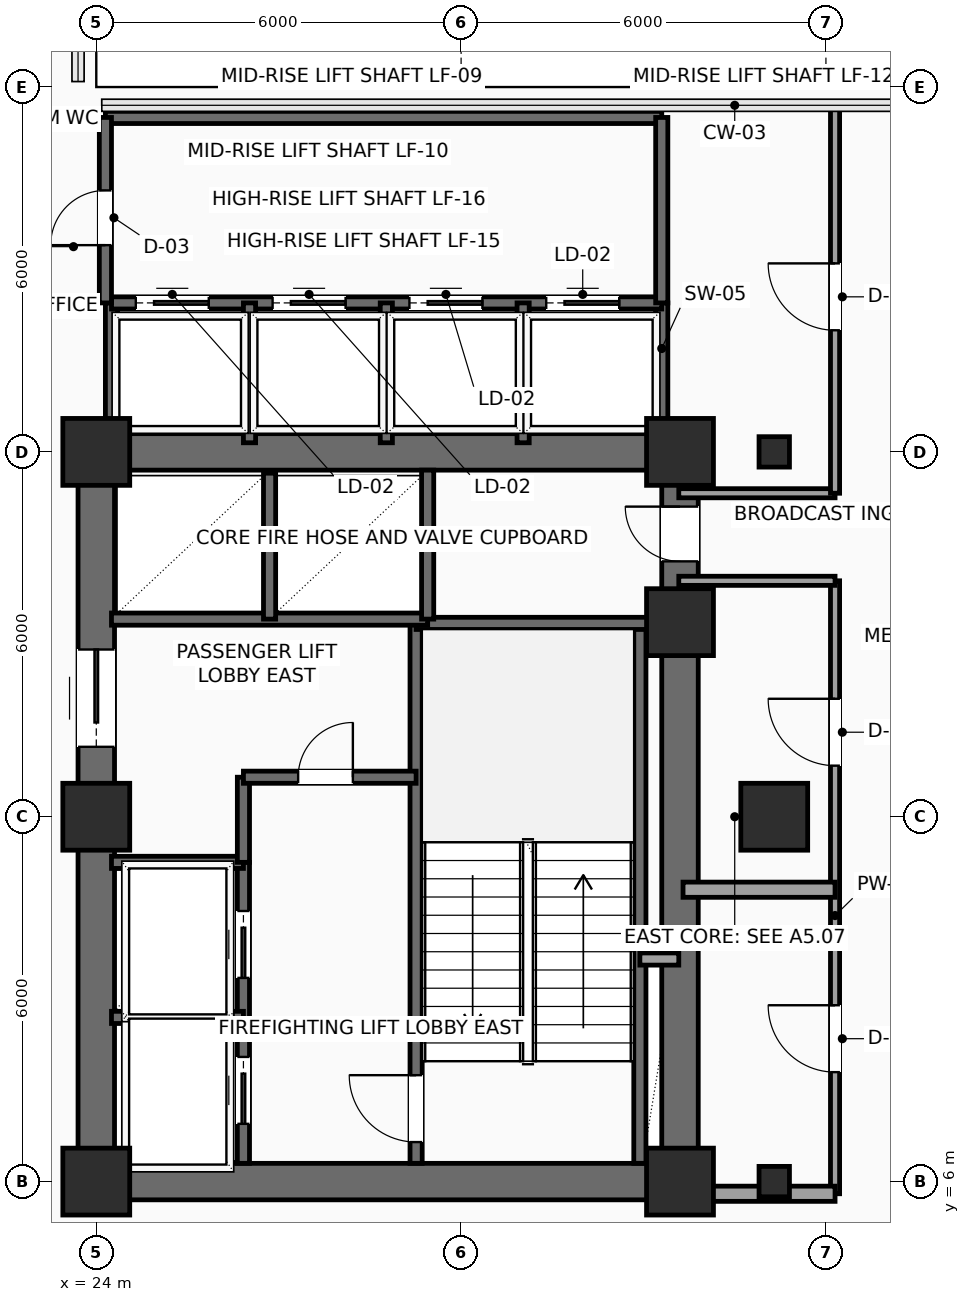
"""IFC4 building model, lengths in metres.
Left out: names, types, materials, properties, quantities, classifications, styles, units other than length and angle.
Written with IfcOpenShell. Run it as: python <this file> out.ifc"""

import sys

from ifc_helpers import new_model, si_unit, direction, frame, frame_2d, origin, origin_2d, place, context, subcontext, project, spatial, rectangle, hollow_rectangle, extrude, element, fill, save


model = new_model("IFC4")
c1 = context("Model", 3, precision=1e-05, world=origin(), true_north=direction((0.0, 1.0)))
c2 = subcontext(c1, "Body", "Model", "MODEL_VIEW")
j1 = project(units=[si_unit("LENGTHUNIT", "METRE"), si_unit("PLANEANGLEUNIT", "RADIAN")], contexts=[c1])
p1 = place(None, origin())
s1 = spatial("IfcSite", under=j1, at=p1, CompositionType="ELEMENT")
p2 = place(p1, origin())
s2 = spatial("IfcBuilding", under=s1, at=p2, CompositionType="ELEMENT")
p3 = place(p2, frame((0.0, 0.0, 134.4)))
s3 = spatial("IfcBuildingStorey", under=s2, at=p3, CompositionType="ELEMENT", Elevation=134.4)
for number, where, z_axis, x_axis in (
    (1, (24.0, 6.0, 0.0), (0.0, 0.0, 1.0), (1.0, 0.0, 0.0)),
    (2, (24.0, 12.0, 0.0), (0.0, 0.0, 1.0), (1.0, 0.0, 0.0)),
    (3, (24.0, 18.0, 0.0), (0.0, 0.0, 1.0), (1.0, 0.0, 0.0)),
    (4, (33.6, 6.0, 0.0), (0.0, 0.0, 1.0), (1.0, 0.0, 0.0)),
    (5, (33.6, 15.2, 0.0), (0.0, 0.0, 1.0), (1.0, 0.0, 0.0)),
    (6, (33.6, 18.0, 0.0), (0.0, 0.0, 1.0), (1.0, 0.0, 0.0)),
):
    element("IfcColumn", number, at=place(p3, frame(where, z_axis=z_axis, x_axis=x_axis)), inside=s3, PredefinedType="COLUMN", context=c2, shape_type="SweptSolid", body=[
        extrude(rectangle(XDim=1.1, YDim=1.1, at=origin_2d()), origin(), (0.0, 0.0, 1.0), 3.75),
    ])
p4 = place(p3, frame((35.15, 6.0, 0.0), z_axis=(0.0, 0.0, 1.0), x_axis=(1.0, 0.0, 0.0)))
e7 = element("IfcColumn", 7, at=p4, inside=s3, PredefinedType="COLUMN", context=c2, shape_type="SweptSolid", body=[
    extrude(hollow_rectangle(XDim=0.5, YDim=0.5, WallThickness=0.025, InnerFilletRadius=0.025, OuterFilletRadius=0.04, at=origin_2d()), origin(), (0.0, 0.0, 1.0), 3.75),
])
p5 = place(p3, frame((35.15, 12.0, 0.0), z_axis=(0.0, 0.0, 1.0), x_axis=(1.0, 0.0, 0.0)))
e8 = element("IfcColumn", 8, at=p5, inside=s3, PredefinedType="COLUMN", context=c2, shape_type="SweptSolid", body=[
    extrude(rectangle(XDim=1.1, YDim=1.1, at=origin_2d()), origin(), (0.0, 0.0, 1.0), 3.75),
])
p6 = place(p3, frame((35.15, 18.0, 0.0), z_axis=(0.0, 0.0, 1.0), x_axis=(1.0, 0.0, 0.0)))
e9 = element("IfcColumn", 9, at=p6, inside=s3, PredefinedType="COLUMN", context=c2, shape_type="SweptSolid", body=[
    extrude(hollow_rectangle(XDim=0.5, YDim=0.5, WallThickness=0.025, InnerFilletRadius=0.025, OuterFilletRadius=0.04, at=origin_2d()), origin(), (0.0, 0.0, 1.0), 3.75),
])
for number, where, z_axis, x_axis in (
    (10, (24.0, 6.0, 0.0), (0.0, 0.0, 1.0), (1.0, 0.0, 0.0)),
    (11, (24.0, 18.0, 0.0), (0.0, 0.0, 1.0), (1.0, 0.0, 0.0)),
):
    element("IfcWall", number, at=place(p3, frame(where, z_axis=z_axis, x_axis=x_axis)), inside=s3, PredefinedType="SHEAR", context=c2, shape_type="SweptSolid", body=[
        extrude(rectangle(XDim=9.6, YDim=0.6, at=frame_2d((4.8, 0.0))), origin(), (0.0, 0.0, 1.0), 3.525),
    ])
p7 = place(p3, frame((24.0, 6.0, 0.0), z_axis=(0.0, 0.0, 1.0), x_axis=(0.0, 1.0, 0.0)))
e12 = element("IfcWall", 12, at=p7, inside=s3, PredefinedType="SHEAR", context=c2, shape_type="SweptSolid", body=[
    extrude(rectangle(XDim=12.0, YDim=0.6, at=frame_2d((6.0, 0.0))), origin(), (0.0, 0.0, 1.0), 3.525),
])
p8 = place(p7, frame((7.15, 0.0, 0.0)))
e13 = element("IfcOpeningElement", 13, at=p8, cuts=e12, PredefinedType="OPENING", context=c2, shape_type="SweptSolid", body=[
    extrude(rectangle(XDim=1.6, YDim=2.3, at=frame_2d((0.8, 1.15))), frame((0.0, 0.31, 0.0), z_axis=(0.0, -1.0, 0.0), x_axis=(1.0, 0.0, 0.0)), (0.0, 0.0, 1.0), 0.62),
])
p9 = place(p3, frame((33.6, 6.0, 0.0), z_axis=(0.0, 0.0, 1.0), x_axis=(0.0, 1.0, 0.0)))
e14 = element("IfcWall", 14, at=p9, inside=s3, PredefinedType="SHEAR", context=c2, shape_type="SweptSolid", body=[
    extrude(rectangle(XDim=12.0, YDim=0.6, at=frame_2d((6.0, 0.0))), origin(), (0.0, 0.0, 1.0), 3.525),
])
p10 = place(p9, frame((10.2, 0.0, 0.0)))
e15 = element("IfcOpeningElement", 15, at=p10, cuts=e14, PredefinedType="OPENING", context=c2, shape_type="SweptSolid", body=[
    extrude(rectangle(XDim=0.9, YDim=2.15, at=frame_2d((0.45, 1.075))), frame((0.0, 0.31, 0.0), z_axis=(0.0, -1.0, 0.0), x_axis=(1.0, 0.0, 0.0)), (0.0, 0.0, 1.0), 0.62),
])
p11 = place(p3, frame((29.26, 6.3, 0.0), z_axis=(0.0, 0.0, 1.0), x_axis=(0.0, 1.0, 0.0)))
e16 = element("IfcWall", 16, at=p11, inside=s3, PredefinedType="SHEAR", context=c2, shape_type="SweptSolid", body=[
    extrude(rectangle(XDim=8.88, YDim=0.2, at=frame_2d((4.44, 0.0))), origin(), (0.0, 0.0, 1.0), 3.525),
])
p12 = place(p11, frame((0.35, 0.0, 0.0)))
e17 = element("IfcOpeningElement", 17, at=p12, cuts=e16, PredefinedType="OPENING", context=c2, shape_type="SweptSolid", body=[
    extrude(rectangle(XDim=1.1, YDim=2.2, at=frame_2d((0.55, 1.1))), frame((0.0, 0.11, 0.0), z_axis=(0.0, -1.0, 0.0), x_axis=(1.0, 0.0, 0.0)), (0.0, 0.0, 1.0), 0.22),
])
p13 = place(p3, frame((32.94, 6.3, 0.0), z_axis=(0.0, 0.0, 1.0), x_axis=(0.0, 1.0, 0.0)))
e18 = element("IfcWall", 18, at=p13, inside=s3, PredefinedType="SHEAR", context=c2, shape_type="SweptSolid", body=[
    extrude(rectangle(XDim=8.88, YDim=0.2, at=frame_2d((4.44, 0.0))), origin(), (0.0, 0.0, 1.0), 3.525),
])
p14 = place(p3, frame((29.26, 15.18, 0.0), z_axis=(0.0, 0.0, 1.0), x_axis=(1.0, 0.0, 0.0)))
e19 = element("IfcWall", 19, at=p14, inside=s3, PredefinedType="SHEAR", context=c2, shape_type="SweptSolid", body=[
    extrude(rectangle(XDim=4.04, YDim=0.2, at=frame_2d((2.02, 0.0))), origin(), (0.0, 0.0, 1.0), 3.525),
])
p15 = place(p3, frame((26.42, 6.3, 0.0), z_axis=(0.0, 0.0, 1.0), x_axis=(0.0, 1.0, 0.0)))
e20 = element("IfcWall", 20, at=p15, inside=s3, PredefinedType="SHEAR", context=c2, shape_type="SweptSolid", body=[
    extrude(rectangle(XDim=4.95, YDim=0.2, at=frame_2d((2.475, 0.0))), origin(), (0.0, 0.0, 1.0), 3.525),
])
p16 = place(p15, frame((0.65, 0.0, 0.0)))
e21 = element("IfcOpeningElement", 21, at=p16, cuts=e20, PredefinedType="OPENING", context=c2, shape_type="SweptSolid", body=[
    extrude(rectangle(XDim=1.1, YDim=2.2, at=frame_2d((0.55, 1.1))), frame((0.0, 0.11, 0.0), z_axis=(0.0, -1.0, 0.0), x_axis=(1.0, 0.0, 0.0)), (0.0, 0.0, 1.0), 0.22),
])
p17 = place(p15, frame((3.05, 0.0, 0.0)))
e22 = element("IfcOpeningElement", 22, at=p17, cuts=e20, PredefinedType="OPENING", context=c2, shape_type="SweptSolid", body=[
    extrude(rectangle(XDim=1.1, YDim=2.2, at=frame_2d((0.55, 1.1))), frame((0.0, 0.11, 0.0), z_axis=(0.0, -1.0, 0.0), x_axis=(1.0, 0.0, 0.0)), (0.0, 0.0, 1.0), 0.22),
])
for number, where, z_axis, x_axis in (
    (23, (24.25, 8.7, 0.0), (0.0, 0.0, 1.0), (1.0, 0.0, 0.0)),
    (24, (24.25, 11.25, 0.0), (0.0, 0.0, 1.0), (1.0, 0.0, 0.0)),
):
    element("IfcWall", number, at=place(p3, frame(where, z_axis=z_axis, x_axis=x_axis)), inside=s3, PredefinedType="SHEAR", context=c2, shape_type="SweptSolid", body=[
        extrude(rectangle(XDim=2.17, YDim=0.2, at=frame_2d((1.085, 0.0))), origin(), (0.0, 0.0, 1.0), 3.525),
    ])
p18 = place(p3, frame((26.42, 11.25, 0.0), z_axis=(0.0, 0.0, 1.0), x_axis=(0.0, 1.0, 0.0)))
e25 = element("IfcWall", 25, at=p18, inside=s3, PredefinedType="SHEAR", context=c2, shape_type="SweptSolid", body=[
    extrude(rectangle(XDim=1.4, YDim=0.2, at=frame_2d((0.7, 0.0))), origin(), (0.0, 0.0, 1.0), 3.525),
])
p19 = place(p3, frame((26.42, 12.65, 0.0), z_axis=(0.0, 0.0, 1.0), x_axis=(1.0, 0.0, 0.0)))
e26 = element("IfcWall", 26, at=p19, inside=s3, PredefinedType="SHEAR", context=c2, shape_type="SweptSolid", body=[
    extrude(rectangle(XDim=2.84, YDim=0.2, at=frame_2d((1.42, 0.0))), origin(), (0.0, 0.0, 1.0), 3.525),
])
p20 = place(p19, frame((0.9, 0.0, 0.0)))
e27 = element("IfcOpeningElement", 27, at=p20, cuts=e26, PredefinedType="OPENING", context=c2, shape_type="SweptSolid", body=[
    extrude(rectangle(XDim=0.9, YDim=2.15, at=frame_2d((0.45, 1.075))), frame((0.0, 0.11, 0.0), z_axis=(0.0, -1.0, 0.0), x_axis=(1.0, 0.0, 0.0)), (0.0, 0.0, 1.0), 0.22),
])
p21 = place(p3, frame((32.94, 9.66, 0.0), z_axis=(0.0, 0.0, 1.0), x_axis=(1.0, 0.0, 0.0)))
e28 = element("IfcWall", 28, at=p21, inside=s3, PredefinedType="SOLIDWALL", context=c2, shape_type="SweptSolid", body=[
    extrude(rectangle(XDim=0.64, YDim=0.2, at=frame_2d((0.32, 0.0))), origin(), (0.0, 0.0, 1.0), 3.525),
])
p22 = place(p3, frame((24.25, 15.25, 0.0), z_axis=(0.0, 0.0, 1.0), x_axis=(1.0, 0.0, 0.0)))
e29 = element("IfcWall", 29, at=p22, inside=s3, PredefinedType="SHEAR", context=c2, shape_type="SweptSolid", body=[
    extrude(rectangle(XDim=5.2, YDim=0.2, at=frame_2d((2.6, 0.0))), origin(), (0.0, 0.0, 1.0), 3.525),
])
p23 = place(p3, frame((26.85, 15.25, 0.0), z_axis=(0.0, 0.0, 1.0), x_axis=(0.0, 1.0, 0.0)))
e30 = element("IfcWall", 30, at=p23, inside=s3, PredefinedType="SHEAR", context=c2, shape_type="SweptSolid", body=[
    extrude(rectangle(XDim=2.4, YDim=0.2, at=frame_2d((1.2, 0.0))), origin(), (0.0, 0.0, 1.0), 3.525),
])
p24 = place(p3, frame((29.45, 15.25, 0.0), z_axis=(0.0, 0.0, 1.0), x_axis=(0.0, 1.0, 0.0)))
e31 = element("IfcWall", 31, at=p24, inside=s3, PredefinedType="SHEAR", context=c2, shape_type="SweptSolid", body=[
    extrude(rectangle(XDim=2.45, YDim=0.2, at=frame_2d((1.225, 0.0))), origin(), (0.0, 0.0, 1.0), 3.525),
])
for number, where, z_axis, x_axis in (
    (32, (33.3, 18.1, 0.0), (0.0, 0.0, 1.0), (0.0, 1.0, 0.0)),
    (33, (24.25, 18.1, 0.0), (0.0, 0.0, 1.0), (0.0, 1.0, 0.0)),
):
    element("IfcWall", number, at=place(p3, frame(where, z_axis=z_axis, x_axis=x_axis)), inside=s3, PredefinedType="SHEAR", context=c2, shape_type="SweptSolid", body=[
        extrude(rectangle(XDim=2.35, YDim=0.2, at=frame_2d((1.175, 0.0))), origin(), (0.0, 0.0, 1.0), 3.525),
    ])
p25 = place(p3, frame((24.25, 20.45, 0.0), z_axis=(0.0, 0.0, 1.0), x_axis=(1.0, 0.0, 0.0)))
e34 = element("IfcWall", 34, at=p25, inside=s3, PredefinedType="SHEAR", context=c2, shape_type="SweptSolid", body=[
    extrude(rectangle(XDim=9.05, YDim=0.2, at=frame_2d((4.525, 0.0))), origin(), (0.0, 0.0, 1.0), 3.525),
])
p26 = place(p25, frame((0.4, 0.0, 0.0)))
e35 = element("IfcOpeningElement", 35, at=p26, cuts=e34, PredefinedType="OPENING", context=c2, shape_type="SweptSolid", body=[
    extrude(rectangle(XDim=1.2, YDim=2.2, at=frame_2d((0.6, 1.1))), frame((0.0, 0.11, 0.0), z_axis=(0.0, -1.0, 0.0), x_axis=(1.0, 0.0, 0.0)), (0.0, 0.0, 1.0), 0.22),
])
p27 = place(p25, frame((2.65, 0.0, 0.0)))
e36 = element("IfcOpeningElement", 36, at=p27, cuts=e34, PredefinedType="OPENING", context=c2, shape_type="SweptSolid", body=[
    extrude(rectangle(XDim=1.2, YDim=2.2, at=frame_2d((0.6, 1.1))), frame((0.0, 0.11, 0.0), z_axis=(0.0, -1.0, 0.0), x_axis=(1.0, 0.0, 0.0)), (0.0, 0.0, 1.0), 0.22),
])
p28 = place(p25, frame((4.9, 0.0, 0.0)))
e37 = element("IfcOpeningElement", 37, at=p28, cuts=e34, PredefinedType="OPENING", context=c2, shape_type="SweptSolid", body=[
    extrude(rectangle(XDim=1.2, YDim=2.2, at=frame_2d((0.6, 1.1))), frame((0.0, 0.11, 0.0), z_axis=(0.0, -1.0, 0.0), x_axis=(1.0, 0.0, 0.0)), (0.0, 0.0, 1.0), 0.22),
])
p29 = place(p25, frame((7.15, 0.0, 0.0)))
e38 = element("IfcOpeningElement", 38, at=p29, cuts=e34, PredefinedType="OPENING", context=c2, shape_type="SweptSolid", body=[
    extrude(rectangle(XDim=1.2, YDim=2.2, at=frame_2d((0.6, 1.1))), frame((0.0, 0.11, 0.0), z_axis=(0.0, -1.0, 0.0), x_axis=(1.0, 0.0, 0.0)), (0.0, 0.0, 1.0), 0.22),
])
for number, where, z_axis, x_axis in (
    (39, (26.52, 18.15, 0.0), (0.0, 0.0, 1.0), (0.0, 1.0, 0.0)),
    (40, (28.77, 18.15, 0.0), (0.0, 0.0, 1.0), (0.0, 1.0, 0.0)),
    (41, (31.02, 18.15, 0.0), (0.0, 0.0, 1.0), (0.0, 1.0, 0.0)),
):
    element("IfcWall", number, at=place(p3, frame(where, z_axis=z_axis, x_axis=x_axis)), inside=s3, PredefinedType="SHEAR", context=c2, shape_type="SweptSolid", body=[
        extrude(rectangle(XDim=2.3, YDim=0.2, at=frame_2d((1.15, 0.0))), origin(), (0.0, 0.0, 1.0), 3.525),
    ])
p30 = place(p3, frame((24.15, 23.5, 0.0), z_axis=(0.0, 0.0, 1.0), x_axis=(1.0, 0.0, 0.0)))
e42 = element("IfcWall", 42, at=p30, inside=s3, PredefinedType="SHEAR", context=c2, shape_type="SweptSolid", body=[
    extrude(rectangle(XDim=9.15, YDim=0.2, at=frame_2d((4.575, 0.0))), origin(), (0.0, 0.0, 1.0), 3.525),
])
p31 = place(p3, frame((33.3, 20.45, 0.0), z_axis=(0.0, 0.0, 1.0), x_axis=(0.0, 1.0, 0.0)))
e43 = element("IfcWall", 43, at=p31, inside=s3, PredefinedType="SHEAR", context=c2, shape_type="SweptSolid", body=[
    extrude(rectangle(XDim=3.05, YDim=0.2, at=frame_2d((1.525, 0.0))), origin(), (0.0, 0.0, 1.0), 3.525),
])
p32 = place(p3, frame((24.15, 20.45, 0.0), z_axis=(0.0, 0.0, 1.0), x_axis=(0.0, 1.0, 0.0)))
e44 = element("IfcWall", 44, at=p32, inside=s3, PredefinedType="SHEAR", context=c2, shape_type="SweptSolid", body=[
    extrude(rectangle(XDim=3.05, YDim=0.2, at=frame_2d((1.525, 0.0))), origin(), (0.0, 0.0, 1.0), 3.525),
])
p33 = place(p32, frame((0.95, 0.0, 0.0)))
e45 = element("IfcOpeningElement", 45, at=p33, cuts=e44, PredefinedType="OPENING", context=c2, shape_type="SweptSolid", body=[
    extrude(rectangle(XDim=0.9, YDim=2.15, at=frame_2d((0.45, 1.075))), frame((0.0, 0.11, 0.0), z_axis=(0.0, -1.0, 0.0), x_axis=(1.0, 0.0, 0.0)), (0.0, 0.0, 1.0), 0.22),
])
p34 = place(p3, frame((36.15, 5.8, 0.0), z_axis=(0.0, 0.0, 1.0), x_axis=(0.0, 1.0, 0.0)))
e46 = element("IfcWall", 46, at=p34, inside=s3, PredefinedType="PARTITIONING", context=c2, shape_type="SweptSolid", body=[
    extrude(rectangle(XDim=10.08, YDim=0.15, at=frame_2d((5.04, 0.0))), origin(), (0.0, 0.0, 1.0), 3.525),
])
p35 = place(p34, frame((2.0, 0.0, 0.0)))
e47 = element("IfcOpeningElement", 47, at=p35, cuts=e46, PredefinedType="OPENING", context=c2, shape_type="SweptSolid", body=[
    extrude(rectangle(XDim=1.1, YDim=2.25, at=frame_2d((0.55, 1.125))), frame((0.0, 0.085, 0.0), z_axis=(0.0, -1.0, 0.0), x_axis=(1.0, 0.0, 0.0)), (0.0, 0.0, 1.0), 0.17),
])
p36 = place(p34, frame((7.04, 0.0, 0.0)))
e48 = element("IfcOpeningElement", 48, at=p36, cuts=e46, PredefinedType="OPENING", context=c2, shape_type="SweptSolid", body=[
    extrude(rectangle(XDim=1.1, YDim=2.25, at=frame_2d((0.55, 1.125))), frame((0.0, 0.085, 0.0), z_axis=(0.0, -1.0, 0.0), x_axis=(1.0, 0.0, 0.0)), (0.0, 0.0, 1.0), 0.17),
])
for number, where, z_axis, x_axis in (
    (49, (36.15, 15.88, 0.0), (0.0, 0.0, 1.0), (-1.0, 0.0, 0.0)),
    (50, (33.58, 17.32, 0.0), (0.0, 0.0, 1.0), (1.0, 0.0, 0.0)),
):
    element("IfcWall", number, at=place(p3, frame(where, z_axis=z_axis, x_axis=x_axis)), inside=s3, PredefinedType="PARTITIONING", context=c2, shape_type="SweptSolid", body=[
        extrude(rectangle(XDim=2.57, YDim=0.15, at=frame_2d((1.285, 0.0))), origin(), (0.0, 0.0, 1.0), 3.525),
    ])
p37 = place(p3, frame((36.15, 17.32, 0.0), z_axis=(0.0, 0.0, 1.0), x_axis=(0.0, 1.0, 0.0)))
e51 = element("IfcWall", 51, at=p37, inside=s3, PredefinedType="PARTITIONING", context=c2, shape_type="SweptSolid", body=[
    extrude(rectangle(XDim=6.38, YDim=0.15, at=frame_2d((3.19, 0.0))), origin(), (0.0, 0.0, 1.0), 3.525),
])
p38 = place(p37, frame((2.68, 0.0, 0.0)))
e52 = element("IfcOpeningElement", 52, at=p38, cuts=e51, PredefinedType="OPENING", context=c2, shape_type="SweptSolid", body=[
    extrude(rectangle(XDim=1.1, YDim=2.25, at=frame_2d((0.55, 1.125))), frame((0.0, 0.085, 0.0), z_axis=(0.0, -1.0, 0.0), x_axis=(1.0, 0.0, 0.0)), (0.0, 0.0, 1.0), 0.17),
])
p39 = place(p3, frame((33.65, 5.8, 0.0), z_axis=(0.0, 0.0, 1.0), x_axis=(1.0, 0.0, 0.0)))
e53 = element("IfcWall", 53, at=p39, inside=s3, PredefinedType="PARTITIONING", context=c2, shape_type="SweptSolid", body=[
    extrude(rectangle(XDim=2.5, YDim=0.25, at=frame_2d((1.25, 0.0))), origin(), (0.0, 0.0, 1.0), 3.017),
])
p40 = place(p3, frame((33.65, 10.8, 0.0), z_axis=(0.0, 0.0, 1.0), x_axis=(1.0, 0.0, 0.0)))
e54 = element("IfcWall", 54, at=p40, inside=s3, PredefinedType="PARTITIONING", context=c2, shape_type="SweptSolid", body=[
    extrude(rectangle(XDim=2.5, YDim=0.25, at=frame_2d((1.25, 0.0))), origin(), (0.0, 0.0, 1.0), 3.525),
])
p41 = place(p8, origin())
e55 = element("IfcDoor", 55, at=p41, inside=s3, OperationType="DOUBLE_DOOR_SLIDING", PredefinedType="DOOR", context=c2, shape_type="SweptSolid", body=[
    extrude(rectangle(XDim=1.6, YDim=2.3, at=frame_2d((0.8, 1.15))), frame((0.0, 0.025, 0.0), z_axis=(0.0, -1.0, 0.0), x_axis=(1.0, 0.0, 0.0)), (0.0, 0.0, 1.0), 0.05),
])
fill(e13, e55)
p42 = place(p10, origin())
e56 = element("IfcDoor", 56, at=p42, inside=s3, OperationType="SINGLE_SWING_RIGHT", PredefinedType="DOOR", context=c2, shape_type="SweptSolid", body=[
    extrude(rectangle(XDim=0.9, YDim=2.15, at=frame_2d((0.45, 1.075))), frame((0.0, 0.025, 0.0), z_axis=(0.0, -1.0, 0.0), x_axis=(1.0, 0.0, 0.0)), (0.0, 0.0, 1.0), 0.05),
])
fill(e15, e56)
p43 = place(p12, origin())
e57 = element("IfcDoor", 57, at=p43, inside=s3, OperationType="SINGLE_SWING_RIGHT", PredefinedType="DOOR", context=c2, shape_type="SweptSolid", body=[
    extrude(rectangle(XDim=1.1, YDim=2.2, at=frame_2d((0.55, 1.1))), frame((0.0, 0.025, 0.0), z_axis=(0.0, -1.0, 0.0), x_axis=(1.0, 0.0, 0.0)), (0.0, 0.0, 1.0), 0.05),
])
fill(e17, e57)
p44 = place(p16, origin())
e58 = element("IfcDoor", 58, at=p44, inside=s3, OperationType="SLIDING_TO_LEFT", PredefinedType="DOOR", context=c2, shape_type="SweptSolid", body=[
    extrude(rectangle(XDim=1.1, YDim=2.2, at=frame_2d((0.55, 1.1))), frame((0.0, 0.025, 0.0), z_axis=(0.0, -1.0, 0.0), x_axis=(1.0, 0.0, 0.0)), (0.0, 0.0, 1.0), 0.05),
])
fill(e21, e58)
p45 = place(p17, origin())
e59 = element("IfcDoor", 59, at=p45, inside=s3, OperationType="SLIDING_TO_LEFT", PredefinedType="DOOR", context=c2, shape_type="SweptSolid", body=[
    extrude(rectangle(XDim=1.1, YDim=2.2, at=frame_2d((0.55, 1.1))), frame((0.0, 0.025, 0.0), z_axis=(0.0, -1.0, 0.0), x_axis=(1.0, 0.0, 0.0)), (0.0, 0.0, 1.0), 0.05),
])
fill(e22, e59)
p46 = place(p20, origin())
e60 = element("IfcDoor", 60, at=p46, inside=s3, OperationType="SINGLE_SWING_RIGHT", PredefinedType="DOOR", context=c2, shape_type="SweptSolid", body=[
    extrude(rectangle(XDim=0.9, YDim=2.15, at=frame_2d((0.45, 1.075))), frame((0.0, 0.025, 0.0), z_axis=(0.0, -1.0, 0.0), x_axis=(1.0, 0.0, 0.0)), (0.0, 0.0, 1.0), 0.05),
])
fill(e27, e60)
p47 = place(p26, origin())
e61 = element("IfcDoor", 61, at=p47, inside=s3, OperationType="SLIDING_TO_RIGHT", PredefinedType="DOOR", context=c2, shape_type="SweptSolid", body=[
    extrude(rectangle(XDim=1.2, YDim=2.2, at=frame_2d((0.6, 1.1))), frame((0.0, 0.025, 0.0), z_axis=(0.0, -1.0, 0.0), x_axis=(1.0, 0.0, 0.0)), (0.0, 0.0, 1.0), 0.05),
])
fill(e35, e61)
p48 = place(p27, origin())
e62 = element("IfcDoor", 62, at=p48, inside=s3, OperationType="SLIDING_TO_RIGHT", PredefinedType="DOOR", context=c2, shape_type="SweptSolid", body=[
    extrude(rectangle(XDim=1.2, YDim=2.2, at=frame_2d((0.6, 1.1))), frame((0.0, 0.025, 0.0), z_axis=(0.0, -1.0, 0.0), x_axis=(1.0, 0.0, 0.0)), (0.0, 0.0, 1.0), 0.05),
])
fill(e36, e62)
p49 = place(p28, origin())
e63 = element("IfcDoor", 63, at=p49, inside=s3, OperationType="SLIDING_TO_RIGHT", PredefinedType="DOOR", context=c2, shape_type="SweptSolid", body=[
    extrude(rectangle(XDim=1.2, YDim=2.2, at=frame_2d((0.6, 1.1))), frame((0.0, 0.025, 0.0), z_axis=(0.0, -1.0, 0.0), x_axis=(1.0, 0.0, 0.0)), (0.0, 0.0, 1.0), 0.05),
])
fill(e37, e63)
p50 = place(p29, origin())
e64 = element("IfcDoor", 64, at=p50, inside=s3, OperationType="SLIDING_TO_RIGHT", PredefinedType="DOOR", context=c2, shape_type="SweptSolid", body=[
    extrude(rectangle(XDim=1.2, YDim=2.2, at=frame_2d((0.6, 1.1))), frame((0.0, 0.025, 0.0), z_axis=(0.0, -1.0, 0.0), x_axis=(1.0, 0.0, 0.0)), (0.0, 0.0, 1.0), 0.05),
])
fill(e38, e64)
p51 = place(p33, origin())
e65 = element("IfcDoor", 65, at=p51, inside=s3, OperationType="SINGLE_SWING_LEFT", PredefinedType="DOOR", context=c2, shape_type="SweptSolid", body=[
    extrude(rectangle(XDim=0.9, YDim=2.15, at=frame_2d((0.45, 1.075))), frame((0.0, 0.025, 0.0), z_axis=(0.0, -1.0, 0.0), x_axis=(1.0, 0.0, 0.0)), (0.0, 0.0, 1.0), 0.05),
])
fill(e45, e65)
p52 = place(p35, origin())
e66 = element("IfcDoor", 66, at=p52, inside=s3, OperationType="SINGLE_SWING_RIGHT", PredefinedType="DOOR", context=c2, shape_type="SweptSolid", body=[
    extrude(rectangle(XDim=1.1, YDim=2.25, at=frame_2d((0.55, 1.125))), frame((0.0, 0.025, 0.0), z_axis=(0.0, -1.0, 0.0), x_axis=(1.0, 0.0, 0.0)), (0.0, 0.0, 1.0), 0.05),
])
fill(e47, e66)
p53 = place(p36, origin())
e67 = element("IfcDoor", 67, at=p53, inside=s3, OperationType="SINGLE_SWING_RIGHT", PredefinedType="DOOR", context=c2, shape_type="SweptSolid", body=[
    extrude(rectangle(XDim=1.1, YDim=2.25, at=frame_2d((0.55, 1.125))), frame((0.0, 0.025, 0.0), z_axis=(0.0, -1.0, 0.0), x_axis=(1.0, 0.0, 0.0)), (0.0, 0.0, 1.0), 0.05),
])
fill(e48, e67)
p54 = place(p38, origin())
e68 = element("IfcDoor", 68, at=p54, inside=s3, OperationType="SINGLE_SWING_RIGHT", PredefinedType="DOOR", context=c2, shape_type="SweptSolid", body=[
    extrude(rectangle(XDim=1.1, YDim=2.25, at=frame_2d((0.55, 1.125))), frame((0.0, 0.025, 0.0), z_axis=(0.0, -1.0, 0.0), x_axis=(1.0, 0.0, 0.0)), (0.0, 0.0, 1.0), 0.05),
])
fill(e52, e68)
save(model, sys.argv[1])
